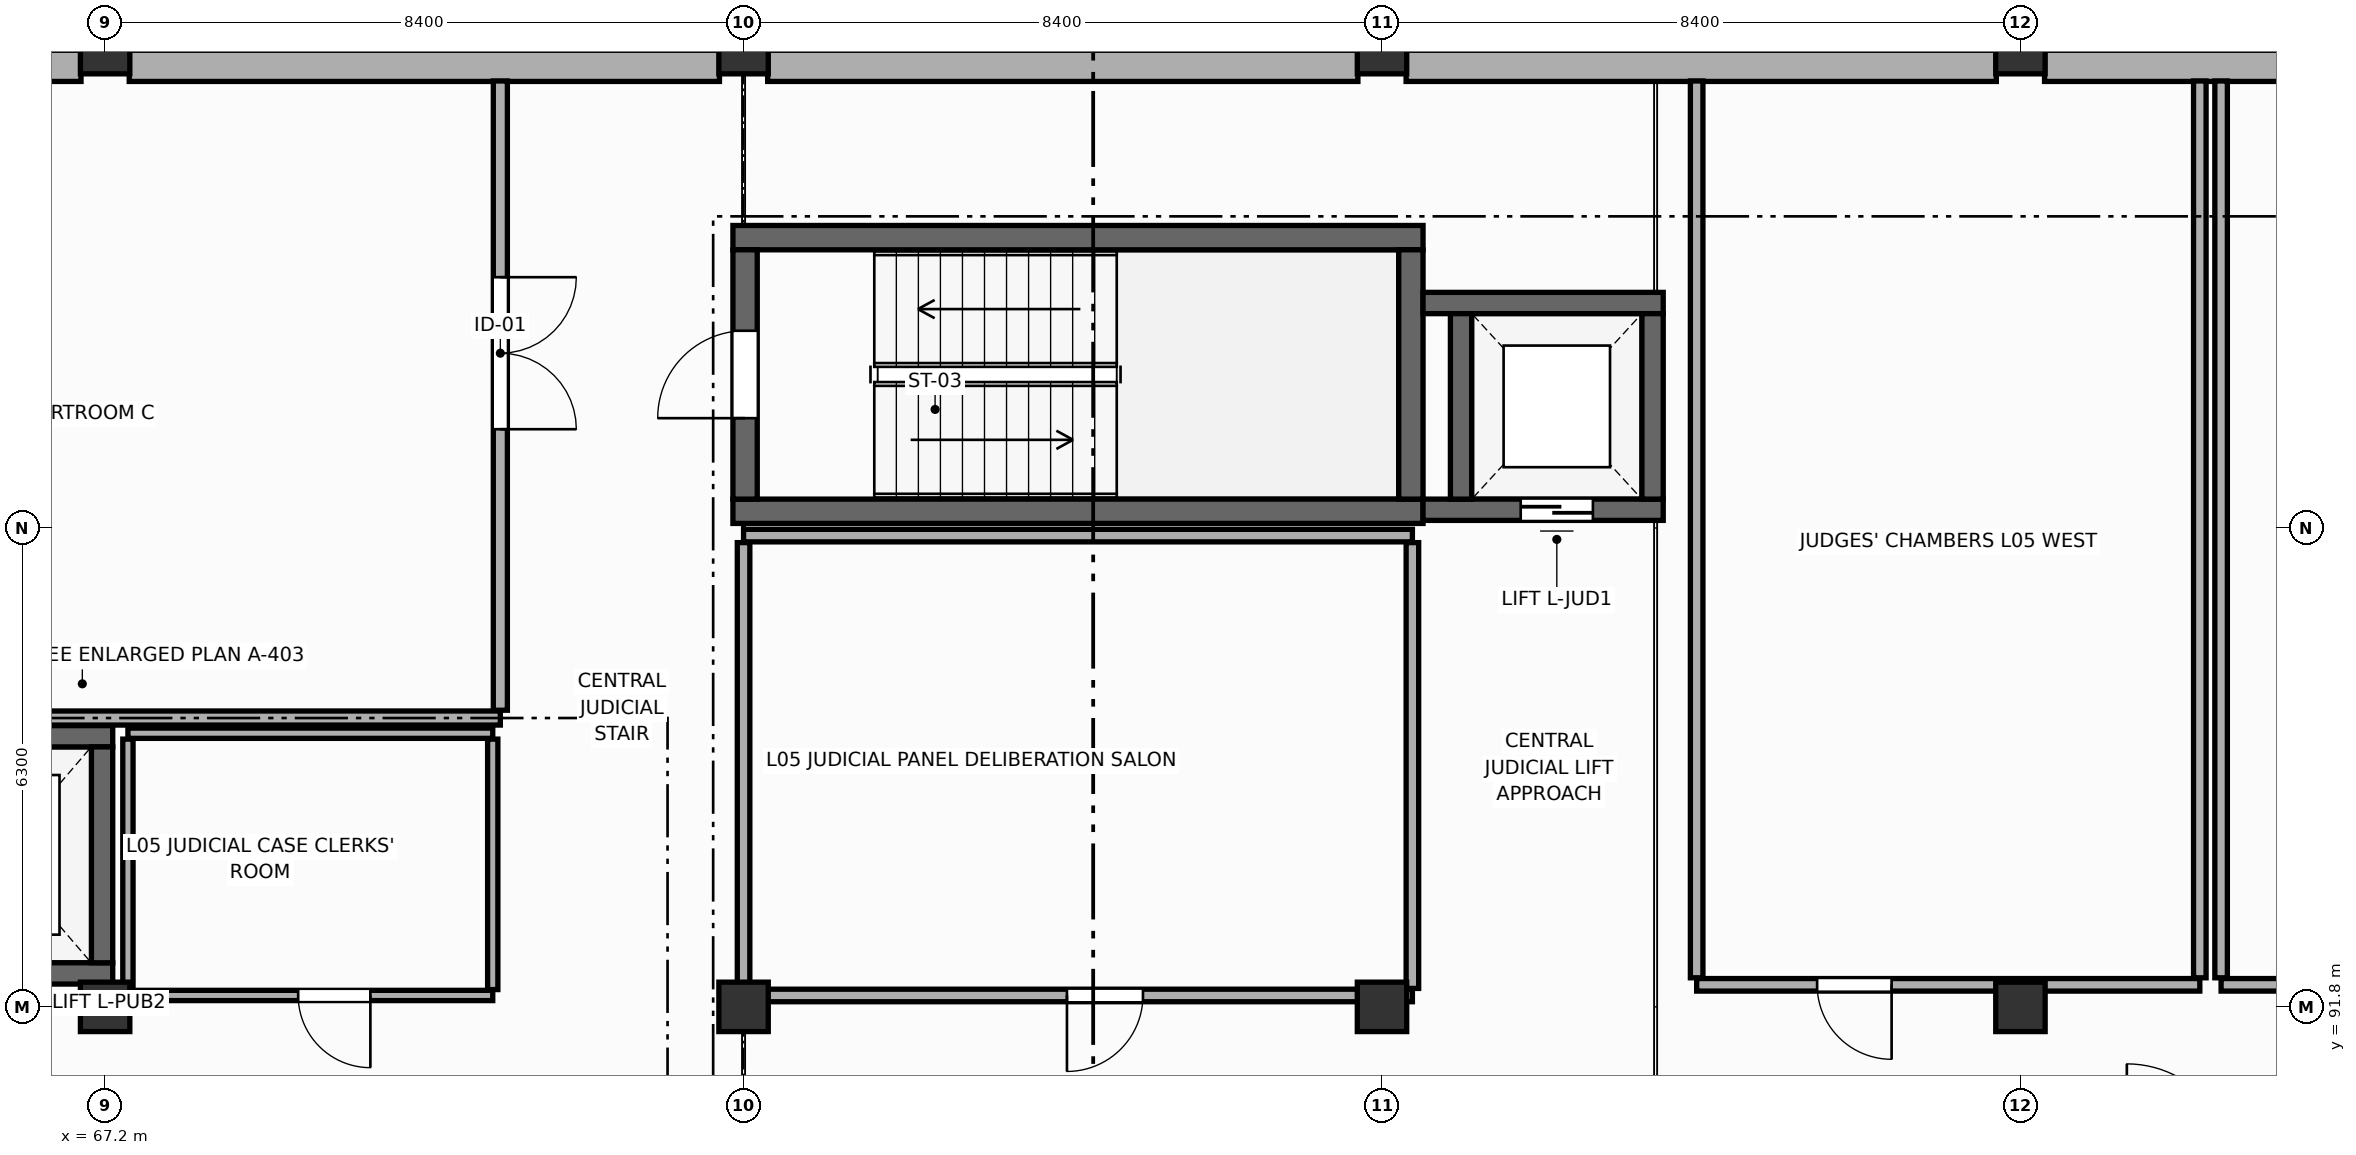
"""IFC4 building model, lengths in metres.
Left out: names, types, materials, properties, quantities, classifications, styles, units other than length and angle.
Written with IfcOpenShell. Run it as: python <this file> out.ifc"""

import sys

from ifc_helpers import new_model, si_unit, direction, frame, frame_2d, origin, origin_2d, place, context, subcontext, project, spatial, rectangle, extrude, element, fill, save


model = new_model("IFC4")
c1 = context("Model", 3, precision=1e-05, world=origin(), true_north=direction((0.0, 1.0)))
c2 = subcontext(c1, "Body", "Model", "MODEL_VIEW")
j1 = project(units=[si_unit("LENGTHUNIT", "METRE"), si_unit("PLANEANGLEUNIT", "RADIAN")], contexts=[c1])
p1 = place(None, origin())
s1 = spatial("IfcSite", under=j1, at=p1, CompositionType="ELEMENT")
p2 = place(p1, origin())
s2 = spatial("IfcBuilding", under=s1, at=p2, CompositionType="ELEMENT")
p3 = place(p2, frame((0.0, 0.0, 18.6)))
s3 = spatial("IfcBuildingStorey", under=s2, at=p3, CompositionType="ELEMENT", Elevation=18.6)
for number, where, z_axis, x_axis in (
    (1, (67.2, 91.8, 0.0), (0.0, 0.0, 1.0), (1.0, 0.0, 0.0)),
    (2, (67.2, 104.4, 0.0), (0.0, 0.0, 1.0), (1.0, 0.0, 0.0)),
    (3, (75.6, 91.8, 0.0), (0.0, 0.0, 1.0), (1.0, 0.0, 0.0)),
    (4, (75.6, 104.4, 0.0), (0.0, 0.0, 1.0), (1.0, 0.0, 0.0)),
    (5, (84.0, 91.8, 0.0), (0.0, 0.0, 1.0), (1.0, 0.0, 0.0)),
    (6, (84.0, 104.4, 0.0), (0.0, 0.0, 1.0), (1.0, 0.0, 0.0)),
    (7, (92.4, 91.8, 0.0), (0.0, 0.0, 1.0), (1.0, 0.0, 0.0)),
    (8, (92.4, 104.4, 0.0), (0.0, 0.0, 1.0), (1.0, 0.0, 0.0)),
):
    element("IfcColumn", number, at=place(p3, frame(where, z_axis=z_axis, x_axis=x_axis)), inside=s3, PredefinedType="COLUMN", context=c2, shape_type="SweptSolid", body=[
        extrude(rectangle(XDim=0.65, YDim=0.65, at=origin_2d()), origin(), (0.0, 0.0, 1.0), 4.2),
    ])
p4 = place(p3, frame((59.117, 104.18, 0.0), z_axis=(0.0, 0.0, 1.0), x_axis=(1.0, 0.0, 0.0)))
e9 = element("IfcWall", 9, at=p4, inside=s3, PredefinedType="STANDARD", context=c2, shape_type="SweptSolid", body=[
    extrude(rectangle(XDim=7.766, YDim=0.41, at=frame_2d((3.883, 0.0))), origin(), (0.0, 0.0, 1.0), 2.49),
])
p5 = place(p3, frame((67.517, 104.18, 0.0), z_axis=(0.0, 0.0, 1.0), x_axis=(1.0, 0.0, 0.0)))
e10 = element("IfcWall", 10, at=p5, inside=s3, PredefinedType="STANDARD", context=c2, shape_type="SweptSolid", body=[
    extrude(rectangle(XDim=7.766, YDim=0.41, at=frame_2d((3.883, 0.0))), origin(), (0.0, 0.0, 1.0), 2.49),
])
for number, where, z_axis, x_axis in (
    (11, (75.917, 104.18, 0.0), (0.0, 0.0, 1.0), (1.0, 0.0, 0.0)),
    (12, (84.317, 104.18, 0.0), (0.0, 0.0, 1.0), (1.0, 0.0, 0.0)),
):
    element("IfcWall", number, at=place(p3, frame(where, z_axis=z_axis, x_axis=x_axis)), inside=s3, PredefinedType="STANDARD", context=c2, shape_type="SweptSolid", body=[
        extrude(rectangle(XDim=7.766, YDim=0.41, at=frame_2d((3.883, 0.0))), origin(), (0.0, 0.0, 1.0), 2.49),
    ])
p6 = place(p3, frame((92.717, 104.18, 0.0), z_axis=(0.0, 0.0, 1.0), x_axis=(1.0, 0.0, 0.0)))
e13 = element("IfcWall", 13, at=p6, inside=s3, PredefinedType="STANDARD", context=c2, shape_type="SweptSolid", body=[
    extrude(rectangle(XDim=8.966, YDim=0.41, at=frame_2d((4.483, 0.0))), origin(), (0.0, 0.0, 1.0), 2.49),
])
for number, where, z_axis, x_axis in (
    (14, (75.46, 101.92, 0.0), (0.0, 0.0, 1.0), (1.0, 0.0, 0.0)),
    (15, (84.54, 98.32, 0.0), (0.0, 0.0, 1.0), (-1.0, 0.0, 0.0)),
):
    element("IfcWall", number, at=place(p3, frame(where, z_axis=z_axis, x_axis=x_axis)), inside=s3, PredefinedType="SHEAR", context=c2, shape_type="SweptSolid", body=[
        extrude(rectangle(XDim=9.08, YDim=0.32, at=frame_2d((4.54, 0.0))), origin(), (0.0, 0.0, 1.0), 3.96),
    ])
p7 = place(p3, frame((75.62, 98.48, 0.0), z_axis=(0.0, 0.0, 1.0), x_axis=(0.0, 1.0, 0.0)))
e16 = element("IfcWall", 16, at=p7, inside=s3, PredefinedType="SHEAR", context=c2, shape_type="SweptSolid", body=[
    extrude(rectangle(XDim=3.28, YDim=0.32, at=frame_2d((1.64, 0.0))), origin(), (0.0, 0.0, 1.0), 3.96),
])
p8 = place(p7, frame((1.065, 0.0, 0.0)))
e17 = element("IfcOpeningElement", 17, at=p8, cuts=e16, PredefinedType="OPENING", context=c2, shape_type="SweptSolid", body=[
    extrude(rectangle(XDim=1.15, YDim=2.2, at=frame_2d((0.575, 1.1))), frame((0.0, 0.17, 0.0), z_axis=(0.0, -1.0, 0.0), x_axis=(1.0, 0.0, 0.0)), (0.0, 0.0, 1.0), 0.34),
])
p9 = place(p3, frame((84.38, 101.76, 0.0), z_axis=(0.0, 0.0, 1.0), x_axis=(0.0, -1.0, 0.0)))
e18 = element("IfcWall", 18, at=p9, inside=s3, PredefinedType="SHEAR", context=c2, shape_type="SweptSolid", body=[
    extrude(rectangle(XDim=3.28, YDim=0.32, at=frame_2d((1.64, 0.0))), origin(), (0.0, 0.0, 1.0), 3.96),
])
p10 = place(p3, frame((64.3, 95.36, 0.0), z_axis=(0.0, 0.0, 1.0), x_axis=(1.0, 0.0, 0.0)))
e19 = element("IfcWall", 19, at=p10, inside=s3, PredefinedType="SHEAR", context=c2, shape_type="SweptSolid", body=[
    extrude(rectangle(XDim=3.0, YDim=0.28, at=frame_2d((1.5, 0.0))), origin(), (0.0, 0.0, 1.0), 3.96),
])
p11 = place(p3, frame((67.3, 92.24, 0.0), z_axis=(0.0, 0.0, 1.0), x_axis=(-1.0, 0.0, 0.0)))
e20 = element("IfcWall", 20, at=p11, inside=s3, PredefinedType="SHEAR", context=c2, shape_type="SweptSolid", body=[
    extrude(rectangle(XDim=3.0, YDim=0.28, at=frame_2d((1.5, 0.0))), origin(), (0.0, 0.0, 1.0), 3.96),
])
p12 = place(p11, frame((0.975, 0.0, 0.0)))
e21 = element("IfcOpeningElement", 21, at=p12, cuts=e20, PredefinedType="OPENING", context=c2, shape_type="SweptSolid", body=[
    extrude(rectangle(XDim=1.05, YDim=2.2, at=frame_2d((0.525, 1.1))), frame((0.0, 0.15, 0.0), z_axis=(0.0, -1.0, 0.0), x_axis=(1.0, 0.0, 0.0)), (0.0, 0.0, 1.0), 0.3),
])
p13 = place(p3, frame((67.16, 95.22, 0.0), z_axis=(0.0, 0.0, 1.0), x_axis=(0.0, -1.0, 0.0)))
e22 = element("IfcWall", 22, at=p13, inside=s3, PredefinedType="SHEAR", context=c2, shape_type="SweptSolid", body=[
    extrude(rectangle(XDim=2.84, YDim=0.28, at=frame_2d((1.42, 0.0))), origin(), (0.0, 0.0, 1.0), 3.96),
])
p14 = place(p3, frame((84.54, 101.06, 0.0), z_axis=(0.0, 0.0, 1.0), x_axis=(1.0, 0.0, 0.0)))
e23 = element("IfcWall", 23, at=p14, inside=s3, PredefinedType="SHEAR", context=c2, shape_type="SweptSolid", body=[
    extrude(rectangle(XDim=3.16, YDim=0.28, at=frame_2d((1.58, 0.0))), origin(), (0.0, 0.0, 1.0), 3.96),
])
p15 = place(p3, frame((87.7, 98.34, 0.0), z_axis=(0.0, 0.0, 1.0), x_axis=(-1.0, 0.0, 0.0)))
e24 = element("IfcWall", 24, at=p15, inside=s3, PredefinedType="SHEAR", context=c2, shape_type="SweptSolid", body=[
    extrude(rectangle(XDim=3.16, YDim=0.28, at=frame_2d((1.58, 0.0))), origin(), (0.0, 0.0, 1.0), 3.96),
])
p16 = place(p15, frame((0.925, 0.0, 0.0)))
e25 = element("IfcOpeningElement", 25, at=p16, cuts=e24, PredefinedType="OPENING", context=c2, shape_type="SweptSolid", body=[
    extrude(rectangle(XDim=0.95, YDim=2.15, at=frame_2d((0.475, 1.075))), frame((0.0, 0.15, 0.0), z_axis=(0.0, -1.0, 0.0), x_axis=(1.0, 0.0, 0.0)), (0.0, 0.0, 1.0), 0.3),
])
for number, where, z_axis, x_axis in (
    (26, (85.04, 98.48, 0.0), (0.0, 0.0, 1.0), (0.0, 1.0, 0.0)),
    (27, (87.56, 100.92, 0.0), (0.0, 0.0, 1.0), (0.0, -1.0, 0.0)),
):
    element("IfcWall", number, at=place(p3, frame(where, z_axis=z_axis, x_axis=x_axis)), inside=s3, PredefinedType="SHEAR", context=c2, shape_type="SweptSolid", body=[
        extrude(rectangle(XDim=2.44, YDim=0.28, at=frame_2d((1.22, 0.0))), origin(), (0.0, 0.0, 1.0), 3.96),
    ])
p17 = place(p3, frame((72.4, 95.6, 0.0), z_axis=(0.0, 0.0, 1.0), x_axis=(-1.0, 0.0, 0.0)))
e28 = element("IfcWall", 28, at=p17, inside=s3, PredefinedType="PARTITIONING", context=c2, shape_type="SweptSolid", body=[
    extrude(rectangle(XDim=13.4, YDim=0.185, at=frame_2d((6.7, 0.0))), origin(), (0.0, 0.0, 1.0), 2.49),
])
p18 = place(p3, frame((72.4, 103.981, 0.0), z_axis=(0.0, 0.0, 1.0), x_axis=(0.0, -1.0, 0.0)))
e29 = element("IfcWall", 29, at=p18, inside=s3, PredefinedType="PARTITIONING", context=c2, shape_type="SweptSolid", body=[
    extrude(rectangle(XDim=8.279, YDim=0.185, at=frame_2d((4.139, 0.0))), origin(), (0.0, 0.0, 1.0), 3.34),
])
p19 = place(p18, frame((2.581, 0.0, 0.0)))
e30 = element("IfcOpeningElement", 30, at=p19, cuts=e29, PredefinedType="OPENING", context=c2, shape_type="SweptSolid", body=[
    extrude(rectangle(XDim=2.0, YDim=2.5, at=frame_2d((1.0, 1.25))), frame((0.0, 0.103, 0.0), z_axis=(0.0, -1.0, 0.0), x_axis=(1.0, 0.0, 0.0)), (0.0, 0.0, 1.0), 0.205),
])
p20 = place(p3, frame((67.5, 95.4, 0.0), z_axis=(0.0, 0.0, 1.0), x_axis=(1.0, 0.0, 0.0)))
e31 = element("IfcWall", 31, at=p20, inside=s3, PredefinedType="PARTITIONING", context=c2, shape_type="SweptSolid", body=[
    extrude(rectangle(XDim=4.8, YDim=0.135, at=frame_2d((2.4, 0.0))), origin(), (0.0, 0.0, 1.0), 2.49),
])
p21 = place(p3, frame((72.3, 91.95, 0.0), z_axis=(0.0, 0.0, 1.0), x_axis=(-1.0, 0.0, 0.0)))
e32 = element("IfcWall", 32, at=p21, inside=s3, PredefinedType="PARTITIONING", context=c2, shape_type="SweptSolid", body=[
    extrude(rectangle(XDim=4.8, YDim=0.135, at=frame_2d((2.4, 0.0))), origin(), (0.0, 0.0, 1.0), 2.44),
])
p22 = place(p21, frame((1.61, 0.0, 0.0)))
e33 = element("IfcOpeningElement", 33, at=p22, cuts=e32, PredefinedType="OPENING", context=c2, shape_type="SweptSolid", body=[
    extrude(rectangle(XDim=0.95, YDim=2.15, at=frame_2d((0.475, 1.075))), frame((0.0, 0.077, 0.0), z_axis=(0.0, -1.0, 0.0), x_axis=(1.0, 0.0, 0.0)), (0.0, 0.0, 1.0), 0.155),
])
p23 = place(p3, frame((67.5, 92.028, 0.0), z_axis=(0.0, 0.0, 1.0), x_axis=(0.0, 1.0, 0.0)))
e34 = element("IfcWall", 34, at=p23, inside=s3, PredefinedType="PARTITIONING", context=c2, shape_type="SweptSolid", body=[
    extrude(rectangle(XDim=3.295, YDim=0.135, at=frame_2d((1.647, 0.0))), origin(), (0.0, 0.0, 1.0), 2.44),
])
p24 = place(p3, frame((72.3, 95.323, 0.0), z_axis=(0.0, 0.0, 1.0), x_axis=(0.0, -1.0, 0.0)))
e35 = element("IfcWall", 35, at=p24, inside=s3, PredefinedType="PARTITIONING", context=c2, shape_type="SweptSolid", body=[
    extrude(rectangle(XDim=3.295, YDim=0.135, at=frame_2d((1.647, 0.0))), origin(), (0.0, 0.0, 1.0), 3.39),
])
p25 = place(p3, frame((75.6, 98.0, 0.0), z_axis=(0.0, 0.0, 1.0), x_axis=(1.0, 0.0, 0.0)))
e36 = element("IfcWall", 36, at=p25, inside=s3, PredefinedType="PARTITIONING", context=c2, shape_type="SweptSolid", body=[
    extrude(rectangle(XDim=8.8, YDim=0.165, at=frame_2d((4.4, 0.0))), origin(), (0.0, 0.0, 1.0), 2.49),
])
p26 = place(p3, frame((84.4, 91.95, 0.0), z_axis=(0.0, 0.0, 1.0), x_axis=(-1.0, 0.0, 0.0)))
e37 = element("IfcWall", 37, at=p26, inside=s3, PredefinedType="PARTITIONING", context=c2, shape_type="SweptSolid", body=[
    extrude(rectangle(XDim=8.8, YDim=0.165, at=frame_2d((4.4, 0.0))), origin(), (0.0, 0.0, 1.0), 2.44),
])
p27 = place(p26, frame((3.545, 0.0, 0.0)))
e38 = element("IfcOpeningElement", 38, at=p27, cuts=e37, PredefinedType="OPENING", context=c2, shape_type="SweptSolid", body=[
    extrude(rectangle(XDim=1.0, YDim=2.15, at=frame_2d((0.5, 1.075))), frame((0.0, 0.093, 0.0), z_axis=(0.0, -1.0, 0.0), x_axis=(1.0, 0.0, 0.0)), (0.0, 0.0, 1.0), 0.185),
])
for number, where, z_axis, x_axis in (
    (39, (75.6, 92.042, 0.0), (0.0, 0.0, 1.0), (0.0, 1.0, 0.0)),
    (40, (84.4, 97.907, 0.0), (0.0, 0.0, 1.0), (0.0, -1.0, 0.0)),
):
    element("IfcWall", number, at=place(p3, frame(where, z_axis=z_axis, x_axis=x_axis)), inside=s3, PredefinedType="PARTITIONING", context=c2, shape_type="SweptSolid", body=[
        extrude(rectangle(XDim=5.865, YDim=0.165, at=frame_2d((2.933, 0.0))), origin(), (0.0, 0.0, 1.0), 2.44),
    ])
p28 = place(p3, frame((94.76, 92.09, 0.0), z_axis=(0.0, 0.0, 1.0), x_axis=(-1.0, 0.0, 0.0)))
e41 = element("IfcWall", 41, at=p28, inside=s3, PredefinedType="PARTITIONING", context=c2, shape_type="SweptSolid", body=[
    extrude(rectangle(XDim=6.62, YDim=0.165, at=frame_2d((3.31, 0.0))), origin(), (0.0, 0.0, 1.0), 2.44),
])
p29 = place(p28, frame((4.055, 0.0, 0.0)))
e42 = element("IfcOpeningElement", 42, at=p29, cuts=e41, PredefinedType="OPENING", context=c2, shape_type="SweptSolid", body=[
    extrude(rectangle(XDim=0.98, YDim=2.2, at=frame_2d((0.49, 1.1))), frame((0.0, 0.093, 0.0), z_axis=(0.0, -1.0, 0.0), x_axis=(1.0, 0.0, 0.0)), (0.0, 0.0, 1.0), 0.185),
])
p30 = place(p3, frame((88.14, 92.183, 0.0), z_axis=(0.0, 0.0, 1.0), x_axis=(0.0, 1.0, 0.0)))
e43 = element("IfcWall", 43, at=p30, inside=s3, PredefinedType="PARTITIONING", context=c2, shape_type="SweptSolid", body=[
    extrude(rectangle(XDim=11.798, YDim=0.165, at=frame_2d((5.899, 0.0))), origin(), (0.0, 0.0, 1.0), 3.34),
])
p31 = place(p3, frame((94.76, 103.981, 0.0), z_axis=(0.0, 0.0, 1.0), x_axis=(0.0, -1.0, 0.0)))
e44 = element("IfcWall", 44, at=p31, inside=s3, PredefinedType="PARTITIONING", context=c2, shape_type="SweptSolid", body=[
    extrude(rectangle(XDim=11.798, YDim=0.165, at=frame_2d((5.899, 0.0))), origin(), (0.0, 0.0, 1.0), 3.29),
])
p32 = place(p3, frame((101.66, 92.09, 0.0), z_axis=(0.0, 0.0, 1.0), x_axis=(-1.0, 0.0, 0.0)))
e45 = element("IfcWall", 45, at=p32, inside=s3, PredefinedType="PARTITIONING", context=c2, shape_type="SweptSolid", body=[
    extrude(rectangle(XDim=6.62, YDim=0.165, at=frame_2d((3.31, 0.0))), origin(), (0.0, 0.0, 1.0), 3.09),
])
p33 = place(p32, frame((2.573, 0.0, 0.0)))
e46 = element("IfcOpeningElement", 46, at=p33, cuts=e45, PredefinedType="OPENING", context=c2, shape_type="SweptSolid", body=[
    extrude(rectangle(XDim=0.98, YDim=2.2, at=frame_2d((0.49, 1.1))), frame((0.0, 0.093, 0.0), z_axis=(0.0, -1.0, 0.0), x_axis=(1.0, 0.0, 0.0)), (0.0, 0.0, 1.0), 0.185),
])
p34 = place(p3, frame((95.04, 92.183, 0.0), z_axis=(0.0, 0.0, 1.0), x_axis=(0.0, 1.0, 0.0)))
e47 = element("IfcWall", 47, at=p34, inside=s3, PredefinedType="PARTITIONING", context=c2, shape_type="SweptSolid", body=[
    extrude(rectangle(XDim=11.798, YDim=0.165, at=frame_2d((5.899, 0.0))), origin(), (0.0, 0.0, 1.0), 3.29),
])
p35 = place(p8, origin())
e48 = element("IfcDoor", 48, at=p35, inside=s3, OperationType="SINGLE_SWING_LEFT", PredefinedType="DOOR", context=c2, shape_type="SweptSolid", body=[
    extrude(rectangle(XDim=1.15, YDim=2.2, at=frame_2d((0.575, 1.1))), frame((0.0, 0.025, 0.0), z_axis=(0.0, -1.0, 0.0), x_axis=(1.0, 0.0, 0.0)), (0.0, 0.0, 1.0), 0.05),
])
fill(e17, e48)
p36 = place(p16, origin())
e49 = element("IfcDoor", 49, at=p36, inside=s3, OperationType="DOUBLE_DOOR_SLIDING", PredefinedType="DOOR", context=c2, shape_type="SweptSolid", body=[
    extrude(rectangle(XDim=0.95, YDim=2.15, at=frame_2d((0.475, 1.075))), frame((0.0, 0.025, 0.0), z_axis=(0.0, -1.0, 0.0), x_axis=(1.0, 0.0, 0.0)), (0.0, 0.0, 1.0), 0.05),
])
fill(e25, e49)
p37 = place(p19, origin())
e50 = element("IfcDoor", 50, at=p37, inside=s3, OperationType="DOUBLE_DOOR_SINGLE_SWING", PredefinedType="DOOR", context=c2, shape_type="SweptSolid", body=[
    extrude(rectangle(XDim=2.0, YDim=2.5, at=frame_2d((1.0, 1.25))), frame((0.0, 0.025, 0.0), z_axis=(0.0, -1.0, 0.0), x_axis=(1.0, 0.0, 0.0)), (0.0, 0.0, 1.0), 0.05),
])
fill(e30, e50)
p38 = place(p22, origin())
e51 = element("IfcDoor", 51, at=p38, inside=s3, OperationType="SINGLE_SWING_LEFT", PredefinedType="DOOR", context=c2, shape_type="SweptSolid", body=[
    extrude(rectangle(XDim=0.95, YDim=2.15, at=frame_2d((0.475, 1.075))), frame((0.0, 0.025, 0.0), z_axis=(0.0, -1.0, 0.0), x_axis=(1.0, 0.0, 0.0)), (0.0, 0.0, 1.0), 0.05),
])
fill(e33, e51)
p39 = place(p27, origin())
e52 = element("IfcDoor", 52, at=p39, inside=s3, OperationType="SINGLE_SWING_RIGHT", PredefinedType="DOOR", context=c2, shape_type="SweptSolid", body=[
    extrude(rectangle(XDim=1.0, YDim=2.15, at=frame_2d((0.5, 1.075))), frame((0.0, 0.025, 0.0), z_axis=(0.0, -1.0, 0.0), x_axis=(1.0, 0.0, 0.0)), (0.0, 0.0, 1.0), 0.05),
])
fill(e38, e52)
p40 = place(p29, origin())
e53 = element("IfcDoor", 53, at=p40, inside=s3, OperationType="SINGLE_SWING_LEFT", PredefinedType="DOOR", context=c2, shape_type="SweptSolid", body=[
    extrude(rectangle(XDim=0.98, YDim=2.2, at=frame_2d((0.49, 1.1))), frame((0.0, 0.025, 0.0), z_axis=(0.0, -1.0, 0.0), x_axis=(1.0, 0.0, 0.0)), (0.0, 0.0, 1.0), 0.05),
])
fill(e42, e53)
save(model, sys.argv[1])
